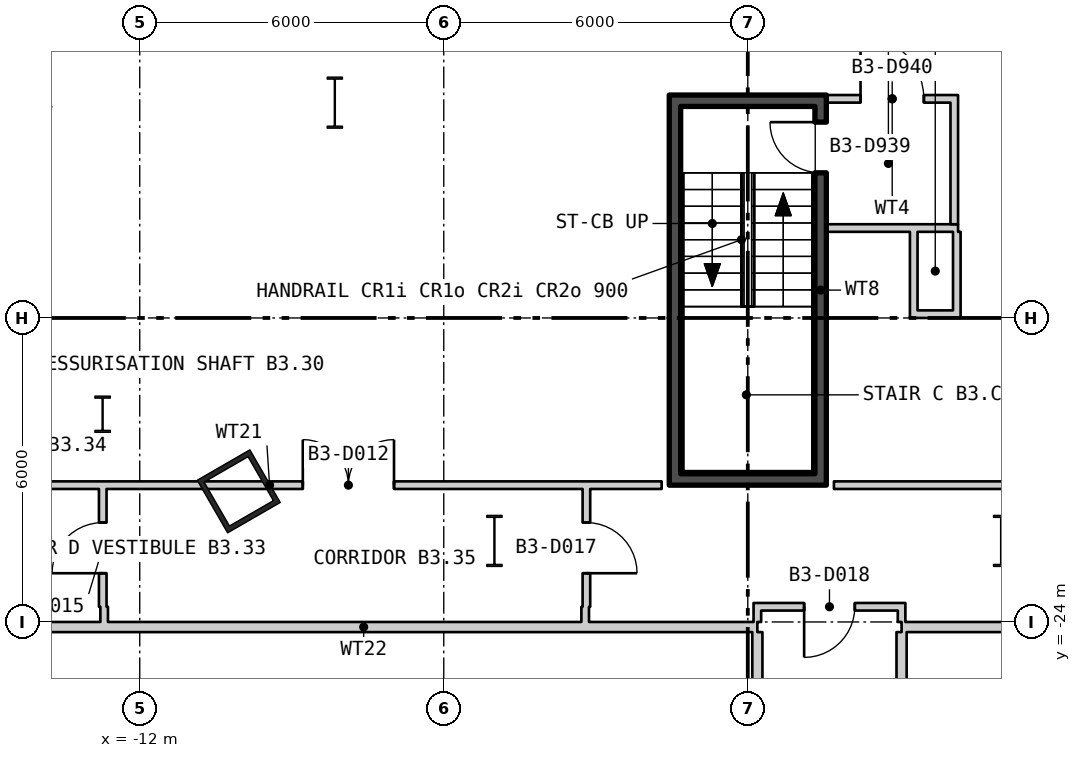
"""IFC4 building model, lengths in metres.
Left out: names, types, materials, properties, quantities, classifications, styles, units other than length and angle.
Written with IfcOpenShell. Run it as: python <this file> out.ifc"""

import sys

from ifc_helpers import new_model, si_unit, direction, frame, frame_2d, origin, origin_2d, place, context, subcontext, project, spatial, rectangle, hollow_rectangle, i_section, extrude, element, fill, save


model = new_model("IFC4")
c1 = context("Model", 3, precision=1e-05, world=origin(), true_north=direction((0.0, 1.0)))
c2 = subcontext(c1, "Body", "Model", "MODEL_VIEW")
j1 = project(units=[si_unit("LENGTHUNIT", "METRE"), si_unit("PLANEANGLEUNIT", "RADIAN")], contexts=[c1])
p1 = place(None, origin())
s1 = spatial("IfcSite", under=j1, at=p1, CompositionType="ELEMENT")
p2 = place(p1, origin())
s2 = spatial("IfcBuilding", under=s1, at=p2, CompositionType="ELEMENT")
p3 = place(p2, frame((0.0, 0.0, -16.8)))
s3 = spatial("IfcBuildingStorey", under=s2, at=p3, CompositionType="ELEMENT", Elevation=-16.8)
p4 = place(p3, frame((-10.046, -21.422, 0.0), z_axis=(0.0, 0.0, 1.0), x_axis=(0.5, -0.866025403784, 0.0)))
e1 = element("IfcColumn", 1, at=p4, inside=s3, PredefinedType="COLUMN", context=c2, shape_type="SweptSolid", body=[
    extrude(hollow_rectangle(XDim=1.2, YDim=1.2, WallThickness=0.1, at=origin_2d()), origin(), (0.0, 0.0, 1.0), 5.4),
])
for number, where, z_axis, x_axis in (
    (2, (-8.15, -13.75, 0.0), (0.0, 0.0, 1.0), (1.0, 0.0, 0.0)),
    (3, (5.0, -22.4, 0.0), (0.0, 0.0, 1.0), (1.0, 0.0, 0.0)),
    (4, (-5.0, -22.4, 0.0), (0.0, 0.0, 1.0), (1.0, 0.0, 0.0)),
):
    element("IfcColumn", number, at=place(p3, frame(where, z_axis=z_axis, x_axis=x_axis)), inside=s3, PredefinedType="COLUMN", context=c2, shape_type="SweptSolid", body=[
        extrude(i_section(OverallWidth=0.302, OverallDepth=1.008, WebThickness=0.021, FlangeThickness=0.04, at=origin_2d()), origin(), (0.0, 0.0, 1.0), 5.4),
    ])
p5 = place(p3, frame((-12.733, -19.9, 0.0), z_axis=(0.0, 0.0, 1.0), x_axis=(1.0, 0.0, 0.0)))
e5 = element("IfcColumn", 5, at=p5, inside=s3, PredefinedType="COLUMN", context=c2, shape_type="SweptSolid", body=[
    extrude(i_section(OverallWidth=0.304, OverallDepth=0.716, WebThickness=0.021, FlangeThickness=0.04, at=origin_2d()), origin(), (0.0, 0.0, 1.0), 5.4),
])
p6 = place(p3, frame((-1.438, -21.075, 0.0), z_axis=(0.0, 0.0, 1.0), x_axis=(0.0, 1.0, 0.0)))
e6 = element("IfcWall", 6, at=p6, inside=s3, PredefinedType="SHEAR", context=c2, shape_type="SweptSolid", body=[
    extrude(rectangle(XDim=7.25, YDim=0.225, at=frame_2d((3.625, 0.0))), origin(), (0.0, 0.0, 1.0), 4.95),
])
p7 = place(p3, frame((1.438, -21.075, 0.0), z_axis=(0.0, 0.0, 1.0), x_axis=(0.0, 1.0, 0.0)))
e7 = element("IfcWall", 7, at=p7, inside=s3, PredefinedType="SHEAR", context=c2, shape_type="SweptSolid", body=[
    extrude(rectangle(XDim=7.25, YDim=0.225, at=frame_2d((3.625, 0.0))), origin(), (0.0, 0.0, 1.0), 4.95),
])
p8 = place(p7, frame((5.94, 0.0, 0.0)))
e8 = element("IfcOpeningElement", 8, at=p8, cuts=e7, PredefinedType="OPENING", context=c2, shape_type="SweptSolid", body=[
    extrude(rectangle(XDim=1.0, YDim=2.1, at=frame_2d((0.5, 1.05))), frame((0.0, 0.122, 0.0), z_axis=(0.0, -1.0, 0.0), x_axis=(1.0, 0.0, 0.0)), (0.0, 0.0, 1.0), 0.245),
])
for number, where, z_axis, x_axis in (
    (9, (-1.55, -21.188, 0.0), (0.0, 0.0, 1.0), (1.0, 0.0, 0.0)),
    (10, (-1.55, -13.713, 0.0), (0.0, 0.0, 1.0), (1.0, 0.0, 0.0)),
):
    element("IfcWall", number, at=place(p3, frame(where, z_axis=z_axis, x_axis=x_axis)), inside=s3, PredefinedType="SHEAR", context=c2, shape_type="SweptSolid", body=[
        extrude(rectangle(XDim=3.1, YDim=0.225, at=frame_2d((1.55, 0.0))), origin(), (0.0, 0.0, 1.0), 4.95),
    ])
p9 = place(p3, frame((1.55, -16.225, 0.0), z_axis=(0.0, 0.0, 1.0), x_axis=(1.0, 0.0, 0.0)))
e11 = element("IfcWall", 11, at=p9, inside=s3, PredefinedType="PARTITIONING", context=c2, shape_type="SweptSolid", body=[
    extrude(rectangle(XDim=2.6, YDim=0.15, at=frame_2d((1.3, 0.0))), origin(), (0.0, 0.0, 1.0), 4.95),
])
p10 = place(p3, frame((4.075, -16.15, 0.0), z_axis=(0.0, 0.0, 1.0), x_axis=(0.0, 1.0, 0.0)))
e12 = element("IfcWall", 12, at=p10, inside=s3, PredefinedType="PARTITIONING", context=c2, shape_type="SweptSolid", body=[
    extrude(rectangle(XDim=2.4, YDim=0.15, at=frame_2d((1.2, 0.0))), origin(), (0.0, 0.0, 1.0), 4.95),
])
p11 = place(p3, frame((1.55, -13.675, 0.0), z_axis=(0.0, 0.0, 1.0), x_axis=(1.0, 0.0, 0.0)))
e13 = element("IfcWall", 13, at=p11, inside=s3, PredefinedType="PARTITIONING", context=c2, shape_type="SweptSolid", body=[
    extrude(rectangle(XDim=2.6, YDim=0.15, at=frame_2d((1.3, 0.0))), origin(), (0.0, 0.0, 1.0), 4.95),
])
p12 = place(p11, frame((0.675, 0.0, 0.0)))
e14 = element("IfcOpeningElement", 14, at=p12, cuts=e13, PredefinedType="OPENING", context=c2, shape_type="SweptSolid", body=[
    extrude(rectangle(XDim=1.25, YDim=2.1, at=frame_2d((0.625, 1.05))), frame((0.0, 0.085, 0.0), z_axis=(0.0, -1.0, 0.0), x_axis=(1.0, 0.0, 0.0)), (0.0, 0.0, 1.0), 0.17),
])
p13 = place(p3, frame((3.275, -18.0, 0.0), z_axis=(0.0, 0.0, 1.0), x_axis=(0.0, 1.0, 0.0)))
e15 = element("IfcWall", 15, at=p13, inside=s3, PredefinedType="PARTITIONING", context=c2, shape_type="SweptSolid", body=[
    extrude(rectangle(XDim=1.7, YDim=0.15, at=frame_2d((0.85, 0.0))), origin(), (0.0, 0.0, 1.0), 4.95),
])
p14 = place(p3, frame((3.35, -17.925, 0.0), z_axis=(0.0, 0.0, 1.0), x_axis=(1.0, 0.0, 0.0)))
e16 = element("IfcWall", 16, at=p14, inside=s3, PredefinedType="PARTITIONING", context=c2, shape_type="SweptSolid", body=[
    extrude(rectangle(XDim=0.7, YDim=0.15, at=frame_2d((0.35, 0.0))), origin(), (0.0, 0.0, 1.0), 4.95),
])
p15 = place(p3, frame((4.125, -18.0, 0.0), z_axis=(0.0, 0.0, 1.0), x_axis=(0.0, 1.0, 0.0)))
e17 = element("IfcWall", 17, at=p15, inside=s3, PredefinedType="PARTITIONING", context=c2, shape_type="SweptSolid", body=[
    extrude(rectangle(XDim=1.7, YDim=0.15, at=frame_2d((0.85, 0.0))), origin(), (0.0, 0.0, 1.0), 4.95),
])
p16 = place(p3, frame((-17.175, -21.3, 0.0), z_axis=(0.0, 0.0, 1.0), x_axis=(1.0, 0.0, 0.0)))
e18 = element("IfcWall", 18, at=p16, inside=s3, PredefinedType="PARTITIONING", context=c2, shape_type="SweptSolid", body=[
    extrude(rectangle(XDim=15.475, YDim=0.15, at=frame_2d((7.737, 0.0))), origin(), (0.0, 0.0, 1.0), 4.95),
])
p17 = place(p16, frame((8.393, 0.0, 0.0)))
e19 = element("IfcOpeningElement", 19, at=p17, cuts=e18, PredefinedType="OPENING", context=c2, shape_type="SweptSolid", body=[
    extrude(rectangle(XDim=1.8, YDim=2.1, at=frame_2d((0.9, 1.05))), frame((0.0, 0.085, 0.0), z_axis=(0.0, -1.0, 0.0), x_axis=(1.0, 0.0, 0.0)), (0.0, 0.0, 1.0), 0.17),
])
p18 = place(p3, frame((-15.35, -24.1, 0.0), z_axis=(0.0, 0.0, 1.0), x_axis=(1.0, 0.0, 0.0)))
e20 = element("IfcWall", 20, at=p18, inside=s3, PredefinedType="PARTITIONING", context=c2, shape_type="SweptSolid", body=[
    extrude(rectangle(XDim=15.539, YDim=0.2, at=frame_2d((7.769, 0.0))), origin(), (0.0, 0.0, 1.0), 4.95),
])
p19 = place(p3, frame((-12.73, -23.7, 0.0), z_axis=(0.0, 0.0, 1.0), x_axis=(0.0, 1.0, 0.0)))
e21 = element("IfcWall", 21, at=p19, inside=s3, PredefinedType="PARTITIONING", context=c2, shape_type="SweptSolid", body=[
    extrude(rectangle(XDim=2.325, YDim=0.15, at=frame_2d((1.163, 0.0))), origin(), (0.0, 0.0, 1.0), 4.95),
])
p20 = place(p19, frame((0.662, 0.0, 0.0)))
e22 = element("IfcOpeningElement", 22, at=p20, cuts=e21, PredefinedType="OPENING", context=c2, shape_type="SweptSolid", body=[
    extrude(rectangle(XDim=1.0, YDim=2.1, at=frame_2d((0.5, 1.05))), frame((0.0, 0.085, 0.0), z_axis=(0.0, -1.0, 0.0), x_axis=(1.0, 0.0, 0.0)), (0.0, 0.0, 1.0), 0.17),
])
for number, where, z_axis, x_axis in (
    (23, (-12.702, -24.0, 0.0), (0.0, 0.0, 1.0), (0.0, 1.0, 0.0)),
    (24, (-3.209, -24.0, 0.0), (0.0, 0.0, 1.0), (0.0, 1.0, 0.0)),
):
    element("IfcWall", number, at=place(p3, frame(where, z_axis=z_axis, x_axis=x_axis)), inside=s3, PredefinedType="PARTITIONING", context=c2, shape_type="SweptSolid", body=[
        extrude(rectangle(XDim=0.3, YDim=0.15, at=frame_2d((0.15, 0.0))), origin(), (0.0, 0.0, 1.0), 4.95),
    ])
p21 = place(p3, frame((-3.185, -23.7, 0.0), z_axis=(0.0, 0.0, 1.0), x_axis=(0.0, 1.0, 0.0)))
e25 = element("IfcWall", 25, at=p21, inside=s3, PredefinedType="PARTITIONING", context=c2, shape_type="SweptSolid", body=[
    extrude(rectangle(XDim=2.325, YDim=0.15, at=frame_2d((1.163, 0.0))), origin(), (0.0, 0.0, 1.0), 4.95),
])
p22 = place(p21, frame((0.662, 0.0, 0.0)))
e26 = element("IfcOpeningElement", 26, at=p22, cuts=e25, PredefinedType="OPENING", context=c2, shape_type="SweptSolid", body=[
    extrude(rectangle(XDim=1.0, YDim=2.1, at=frame_2d((0.5, 1.05))), frame((0.0, 0.085, 0.0), z_axis=(0.0, -1.0, 0.0), x_axis=(1.0, 0.0, 0.0)), (0.0, 0.0, 1.0), 0.17),
])
p23 = place(p3, frame((0.114, -23.7, 0.0), z_axis=(0.0, 0.0, 1.0), x_axis=(1.0, 0.0, 0.0)))
e27 = element("IfcWall", 27, at=p23, inside=s3, PredefinedType="PARTITIONING", context=c2, shape_type="SweptSolid", body=[
    extrude(rectangle(XDim=2.996, YDim=0.15, at=frame_2d((1.498, 0.0))), origin(), (0.0, 0.0, 1.0), 4.95),
])
p24 = place(p23, frame((0.998, 0.0, 0.0)))
e28 = element("IfcOpeningElement", 28, at=p24, cuts=e27, PredefinedType="OPENING", context=c2, shape_type="SweptSolid", body=[
    extrude(rectangle(XDim=1.0, YDim=2.1, at=frame_2d((0.5, 1.05))), frame((0.0, 0.085, 0.0), z_axis=(0.0, -1.0, 0.0), x_axis=(1.0, 0.0, 0.0)), (0.0, 0.0, 1.0), 0.17),
])
p25 = place(p3, frame((0.189, -26.762, 0.0), z_axis=(0.0, 0.0, 1.0), x_axis=(0.0, 1.0, 0.0)))
e29 = element("IfcWall", 29, at=p25, inside=s3, PredefinedType="PARTITIONING", context=c2, shape_type="SweptSolid", body=[
    extrude(rectangle(XDim=2.562, YDim=0.2, at=frame_2d((1.281, 0.0))), origin(), (0.0, 0.0, 1.0), 4.95),
])
p26 = place(p3, frame((0.189, -24.0, 0.0), z_axis=(0.0, 0.0, 1.0), x_axis=(0.0, 1.0, 0.0)))
e30 = element("IfcWall", 30, at=p26, inside=s3, PredefinedType="PARTITIONING", context=c2, shape_type="SweptSolid", body=[
    extrude(rectangle(XDim=0.225, YDim=0.15, at=frame_2d((0.113, 0.0))), origin(), (0.0, 0.0, 1.0), 4.95),
])
p27 = place(p3, frame((1.7, -21.3, 0.0), z_axis=(0.0, 0.0, 1.0), x_axis=(1.0, 0.0, 0.0)))
e31 = element("IfcWall", 31, at=p27, inside=s3, PredefinedType="PARTITIONING", context=c2, shape_type="SweptSolid", body=[
    extrude(rectangle(XDim=10.933, YDim=0.15, at=frame_2d((5.466, 0.0))), origin(), (0.0, 0.0, 1.0), 4.95),
])
p28 = place(p3, frame((3.035, -26.762, 0.0), z_axis=(0.0, 0.0, 1.0), x_axis=(0.0, 1.0, 0.0)))
e32 = element("IfcWall", 32, at=p28, inside=s3, PredefinedType="PARTITIONING", context=c2, shape_type="SweptSolid", body=[
    extrude(rectangle(XDim=2.562, YDim=0.2, at=frame_2d((1.281, 0.0))), origin(), (0.0, 0.0, 1.0), 4.95),
])
p29 = place(p3, frame((3.035, -24.1, 0.0), z_axis=(0.0, 0.0, 1.0), x_axis=(1.0, 0.0, 0.0)))
e33 = element("IfcWall", 33, at=p29, inside=s3, PredefinedType="PARTITIONING", context=c2, shape_type="SweptSolid", body=[
    extrude(rectangle(XDim=9.698, YDim=0.2, at=frame_2d((4.849, 0.0))), origin(), (0.0, 0.0, 1.0), 4.95),
])
p30 = place(p29, frame((4.123, 0.0, 0.0)))
e34 = element("IfcOpeningElement", 34, at=p30, cuts=e33, PredefinedType="OPENING", context=c2, shape_type="SweptSolid", body=[
    extrude(rectangle(XDim=1.1, YDim=2.1, at=frame_2d((0.55, 1.05))), frame((0.0, 0.11, 0.0), z_axis=(0.0, -1.0, 0.0), x_axis=(1.0, 0.0, 0.0)), (0.0, 0.0, 1.0), 0.22),
])
p31 = place(p3, frame((3.035, -24.0, 0.0), z_axis=(0.0, 0.0, 1.0), x_axis=(0.0, 1.0, 0.0)))
e35 = element("IfcWall", 35, at=p31, inside=s3, PredefinedType="PARTITIONING", context=c2, shape_type="SweptSolid", body=[
    extrude(rectangle(XDim=0.225, YDim=0.15, at=frame_2d((0.113, 0.0))), origin(), (0.0, 0.0, 1.0), 4.95),
])
p32 = place(p8, origin())
e36 = element("IfcDoor", 36, at=p32, inside=s3, OperationType="SINGLE_SWING_LEFT", PredefinedType="DOOR", context=c2, shape_type="SweptSolid", body=[
    extrude(rectangle(XDim=1.0, YDim=2.1, at=frame_2d((0.5, 1.05))), frame((0.0, 0.025, 0.0), z_axis=(0.0, -1.0, 0.0), x_axis=(1.0, 0.0, 0.0)), (0.0, 0.0, 1.0), 0.05),
])
fill(e8, e36)
p33 = place(p12, origin())
e37 = element("IfcDoor", 37, at=p33, inside=s3, OperationType="SINGLE_SWING_RIGHT", PredefinedType="DOOR", context=c2, shape_type="SweptSolid", body=[
    extrude(rectangle(XDim=1.25, YDim=2.1, at=frame_2d((0.625, 1.05))), frame((0.0, 0.025, 0.0), z_axis=(0.0, -1.0, 0.0), x_axis=(1.0, 0.0, 0.0)), (0.0, 0.0, 1.0), 0.05),
])
fill(e14, e37)
p34 = place(p17, origin())
e38 = element("IfcDoor", 38, at=p34, inside=s3, OperationType="DOUBLE_DOOR_SINGLE_SWING", PredefinedType="DOOR", context=c2, shape_type="SweptSolid", body=[
    extrude(rectangle(XDim=1.8, YDim=2.1, at=frame_2d((0.9, 1.05))), frame((0.0, 0.025, 0.0), z_axis=(0.0, -1.0, 0.0), x_axis=(1.0, 0.0, 0.0)), (0.0, 0.0, 1.0), 0.05),
])
fill(e19, e38)
p35 = place(p20, origin())
e39 = element("IfcDoor", 39, at=p35, inside=s3, OperationType="SINGLE_SWING_RIGHT", PredefinedType="DOOR", context=c2, shape_type="SweptSolid", body=[
    extrude(rectangle(XDim=1.0, YDim=2.1, at=frame_2d((0.5, 1.05))), frame((0.0, 0.025, 0.0), z_axis=(0.0, -1.0, 0.0), x_axis=(1.0, 0.0, 0.0)), (0.0, 0.0, 1.0), 0.05),
])
fill(e22, e39)
p36 = place(p22, origin())
e40 = element("IfcDoor", 40, at=p36, inside=s3, OperationType="SINGLE_SWING_LEFT", PredefinedType="DOOR", context=c2, shape_type="SweptSolid", body=[
    extrude(rectangle(XDim=1.0, YDim=2.1, at=frame_2d((0.5, 1.05))), frame((0.0, 0.025, 0.0), z_axis=(0.0, -1.0, 0.0), x_axis=(1.0, 0.0, 0.0)), (0.0, 0.0, 1.0), 0.05),
])
fill(e26, e40)
p37 = place(p24, origin())
e41 = element("IfcDoor", 41, at=p37, inside=s3, OperationType="SINGLE_SWING_LEFT", PredefinedType="DOOR", context=c2, shape_type="SweptSolid", body=[
    extrude(rectangle(XDim=1.0, YDim=2.1, at=frame_2d((0.5, 1.05))), frame((0.0, 0.025, 0.0), z_axis=(0.0, -1.0, 0.0), x_axis=(1.0, 0.0, 0.0)), (0.0, 0.0, 1.0), 0.05),
])
fill(e28, e41)
save(model, sys.argv[1])
